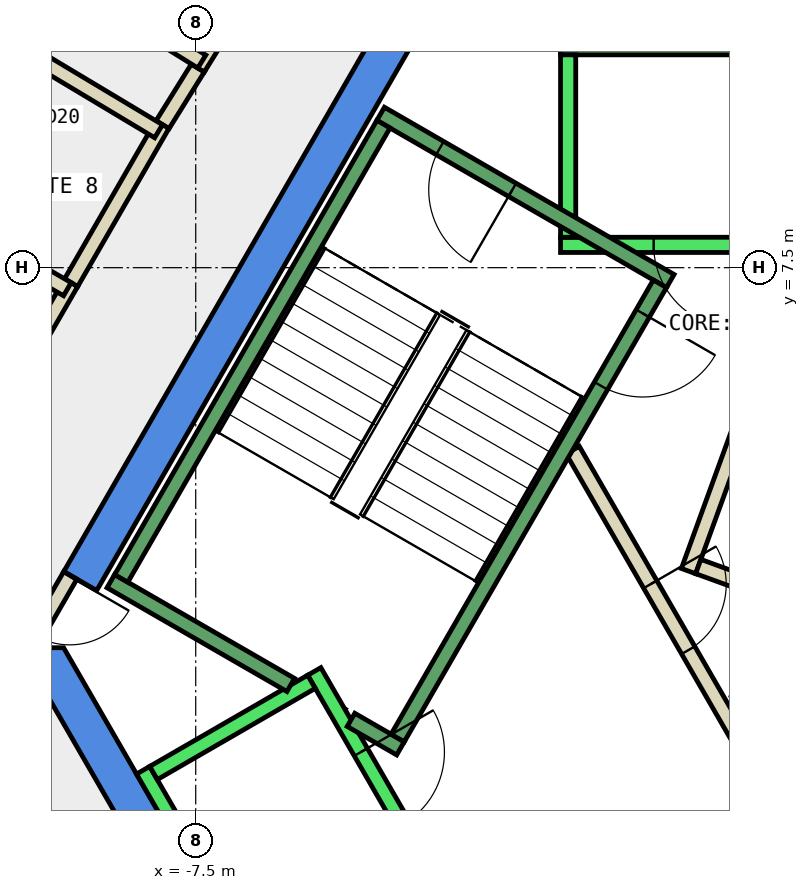
"""IFC4 building model, lengths in metres.
Left out: names, types, materials, properties, quantities, classifications, styles, units other than length and angle.
Written with IfcOpenShell. Run it as: python <this file> out.ifc"""

import sys

from ifc_helpers import new_model, si_unit, direction, frame, frame_2d, origin, place, context, subcontext, project, spatial, polyline, rectangle, outline, extrude, element, fill, save


model = new_model("IFC4")
c1 = context("Model", 3, precision=1e-05, world=origin(), true_north=direction((0.0, 1.0)))
c2 = subcontext(c1, "Body", "Model", "MODEL_VIEW")
j1 = project(units=[si_unit("LENGTHUNIT", "METRE"), si_unit("PLANEANGLEUNIT", "RADIAN")], contexts=[c1])
p1 = place(None, origin())
s1 = spatial("IfcSite", under=j1, at=p1, CompositionType="ELEMENT")
p2 = place(p1, origin())
s2 = spatial("IfcBuilding", under=s1, at=p2, CompositionType="ELEMENT")
p3 = place(p2, frame((0.0, 0.0, 290.0)))
s3 = spatial("IfcBuildingStorey", under=s2, at=p3, CompositionType="ELEMENT", Elevation=290.0)
p4 = place(p3, frame((0.0, 0.0, -0.34)))
e1 = element("IfcWall", 1, at=p4, inside=s3, PredefinedType="SHEAR", context=c2, shape_type="SweptSolid", body=[
    extrude(outline(polyline([(-9.236, 3.502), (-8.803, 3.253), (-4.619, 10.5), (-4.907, 11.0), (-9.236, 3.502)])), origin(), (0.0, 0.0, 1.0), 3.6),
])
p5 = place(p3, frame((0.0, 0.0, -0.34)))
e2 = element("IfcWall", 2, at=p5, inside=s3, PredefinedType="SHEAR", context=c2, shape_type="SweptSolid", body=[
    extrude(outline(polyline([(-9.815, 2.5), (-4.907, -6.0), (-4.619, -5.5), (-9.238, 2.5), (-9.815, 2.5)])), origin(), (0.0, 0.0, 1.0), 3.6),
])
p6 = place(p3, frame((-0.196, 5.764, 0.0), z_axis=(0.0, 0.0, 1.0), x_axis=(-0.34165322761, -0.939826086073, 0.0)))
e3 = element("IfcWall", 3, at=p6, inside=s3, PredefinedType="PARTITIONING", context=c2, shape_type="SweptSolid", body=[
    extrude(rectangle(XDim=2.4, YDim=0.2, at=frame_2d((1.2, 0.0))), origin(), (0.0, 0.0, 1.0), 3.26),
])
p7 = place(p3, frame((-0.888, 3.568, 0.0), z_axis=(0.0, 0.0, 1.0), x_axis=(0.939685034098, -0.34204098686, 0.0)))
e4 = element("IfcWall", 4, at=p7, inside=s3, PredefinedType="PARTITIONING", context=c2, shape_type="SweptSolid", body=[
    extrude(rectangle(XDim=2.237, YDim=0.2, at=frame_2d((1.119, 0.0))), origin(), (0.0, 0.0, 1.0), 3.26),
])
p8 = place(p3, frame((-7.937, 9.38, 0.0), z_axis=(0.0, 0.0, 1.0), x_axis=(0.52850186976, 0.848932137252, 0.0)))
e5 = element("IfcWall", 5, at=p8, inside=s3, PredefinedType="PARTITIONING", context=c2, shape_type="SweptSolid", body=[
    extrude(rectangle(XDim=0.88, YDim=0.2, at=frame_2d((0.44, 0.0))), origin(), (0.0, 0.0, 1.0), 3.26),
])
p9 = place(p3, frame((-7.472, 10.127, 0.0), z_axis=(0.0, 0.0, 1.0), x_axis=(0.527707224705, 0.849426326996, 0.0)))
e6 = element("IfcWall", 6, at=p9, inside=s3, PredefinedType="PARTITIONING", context=c2, shape_type="SweptSolid", body=[
    extrude(rectangle(XDim=3.0, YDim=0.2, at=frame_2d((1.5, 0.0))), origin(), (0.0, 0.0, 1.0), 3.26),
])
p10 = place(p3, frame((-12.082, 2.207, 0.0), z_axis=(0.0, 0.0, 1.0), x_axis=(0.500123454404, 0.865954115618, 0.0)))
e7 = element("IfcWall", 7, at=p10, inside=s3, PredefinedType="PARTITIONING", context=c2, shape_type="SweptSolid", body=[
    extrude(rectangle(XDim=5.885, YDim=0.2, at=frame_2d((2.942, 0.0))), origin(), (0.0, 0.0, 1.0), 3.26),
])
p11 = place(p10, frame((2.493, 0.0, 0.0)))
e8 = element("IfcOpeningElement", 8, at=p11, cuts=e7, PredefinedType="OPENING", context=c2, shape_type="SweptSolid", body=[
    extrude(rectangle(XDim=1.0, YDim=2.1, at=frame_2d((0.5, 1.05))), frame((0.0, 0.11, 0.0), z_axis=(0.0, -1.0, 0.0), x_axis=(1.0, 0.0, 0.0)), (0.0, 0.0, 1.0), 0.22),
])
p12 = place(p3, frame((-9.139, 7.303, 0.0), z_axis=(0.0, 0.0, 1.0), x_axis=(0.499869187296, 0.866100915363, 0.0)))
e9 = element("IfcWall", 9, at=p12, inside=s3, PredefinedType="PARTITIONING", context=c2, shape_type="SweptSolid", body=[
    extrude(rectangle(XDim=2.401, YDim=0.2, at=frame_2d((1.2, 0.0))), origin(), (0.0, 0.0, 1.0), 3.26),
])
p13 = place(p3, frame((-0.982, -1.0, 0.0), z_axis=(0.0, 0.0, 1.0), x_axis=(0.50024047865, 0.865886518847, 0.0)))
e10 = element("IfcWall", 10, at=p13, inside=s3, PredefinedType="PARTITIONING", context=c2, shape_type="SweptSolid", body=[
    extrude(rectangle(XDim=1.863, YDim=0.2, at=frame_2d((0.931, 0.0))), origin(), (0.0, 0.0, 1.0), 3.26),
])
p14 = place(p3, frame((-2.54, 5.1, 0.0), z_axis=(0.0, 0.0, 1.0), x_axis=(0.499925051871, -0.866068670783, 0.0)))
e11 = element("IfcWall", 11, at=p14, inside=s3, PredefinedType="PARTITIONING", context=c2, shape_type="SweptSolid", body=[
    extrude(rectangle(XDim=5.181, YDim=0.2, at=frame_2d((2.59, 0.0))), origin(), (0.0, 0.0, 1.0), 3.26),
])
p15 = place(p14, frame((2.04, 0.0, 0.0)))
e12 = element("IfcOpeningElement", 12, at=p15, cuts=e11, PredefinedType="OPENING", context=c2, shape_type="SweptSolid", body=[
    extrude(rectangle(XDim=1.0, YDim=2.1, at=frame_2d((0.5, 1.05))), frame((0.0, 0.11, 0.0), z_axis=(0.0, -1.0, 0.0), x_axis=(1.0, 0.0, 0.0)), (0.0, 0.0, 1.0), 0.22),
])
p16 = place(p3, frame((-9.543, 11.531, 0.0), z_axis=(0.0, 0.0, 1.0), x_axis=(0.849400119549, -0.527749407305, 0.0)))
e13 = element("IfcWall", 13, at=p16, inside=s3, PredefinedType="PARTITIONING", context=c2, shape_type="SweptSolid", body=[
    extrude(rectangle(XDim=2.5, YDim=0.2, at=frame_2d((1.25, 0.0))), origin(), (0.0, 0.0, 1.0), 3.26),
])
for number, where, z_axis, x_axis in (
    (14, (-7.989, 9.295, 0.0), (0.0, 0.0, 1.0), (-0.858, 0.514, 0.0)),
    (15, (-11.181, 8.367, 0.0), (0.0, 0.0, 1.0), (0.866, -0.5, 0.0)),
):
    element("IfcWall", number, at=place(p3, frame(where, z_axis=z_axis, x_axis=x_axis)), inside=s3, PredefinedType="PARTITIONING", context=c2, shape_type="SweptSolid", body=[
        extrude(rectangle(XDim=2.3, YDim=0.2, at=frame_2d((1.15, 0.0))), origin(), (0.0, 0.0, 1.0), 3.26),
    ])
p17 = place(p3, frame((-9.15, 3.452, 0.0), z_axis=(0.0, 0.0, 1.0), x_axis=(-0.500079945886, -0.865979242085, 0.0)))
e16 = element("IfcWall", 16, at=p17, inside=s3, PredefinedType="PARTITIONING", context=c2, shape_type="SweptSolid", body=[
    extrude(rectangle(XDim=0.926, YDim=0.2, at=frame_2d((0.463, 0.0))), origin(), (0.0, 0.0, 1.0), 2.4),
])
p18 = place(p17, frame((0.017, 0.0, 0.0)))
e17 = element("IfcOpeningElement", 17, at=p18, cuts=e16, PredefinedType="OPENING", context=c2, shape_type="SweptSolid", body=[
    extrude(rectangle(XDim=0.9, YDim=2.1, at=frame_2d((0.45, 1.05))), frame((0.0, 0.11, 0.0), z_axis=(0.0, -1.0, 0.0), x_axis=(1.0, 0.0, 0.0)), (0.0, 0.0, 1.0), 0.22),
])
p19 = place(p3, frame((2.7, 7.8, 0.0), z_axis=(0.0, 0.0, 1.0), x_axis=(-1.0, 0.0, 0.0)))
e18 = element("IfcWall", 18, at=p19, inside=s3, PredefinedType="STANDARD", context=c2, shape_type="SweptSolid", body=[
    extrude(rectangle(XDim=5.4, YDim=0.2, at=frame_2d((2.7, 0.0))), origin(), (0.0, 0.0, 1.0), 3.26),
])
p20 = place(p19, frame((1.225, 0.0, 0.0)))
e19 = element("IfcOpeningElement", 19, at=p20, cuts=e18, PredefinedType="OPENING", context=c2, shape_type="SweptSolid", body=[
    extrude(rectangle(XDim=1.1, YDim=2.1, at=frame_2d((0.55, 1.05))), frame((0.0, 0.11, 0.0), z_axis=(0.0, -1.0, 0.0), x_axis=(1.0, 0.0, 0.0)), (0.0, 0.0, 1.0), 0.22),
])
p21 = place(p19, frame((3.075, 0.0, 0.0)))
e20 = element("IfcOpeningElement", 20, at=p21, cuts=e18, PredefinedType="OPENING", context=c2, shape_type="SweptSolid", body=[
    extrude(rectangle(XDim=1.1, YDim=2.1, at=frame_2d((0.55, 1.05))), frame((0.0, 0.11, 0.0), z_axis=(0.0, -1.0, 0.0), x_axis=(1.0, 0.0, 0.0)), (0.0, 0.0, 1.0), 0.22),
])
p22 = place(p3, frame((2.7, 10.4, 0.0), z_axis=(0.0, 0.0, 1.0), x_axis=(-1.0, 0.0, 0.0)))
e21 = element("IfcWall", 21, at=p22, inside=s3, PredefinedType="STANDARD", context=c2, shape_type="SweptSolid", body=[
    extrude(rectangle(XDim=5.4, YDim=0.2, at=frame_2d((2.7, 0.0))), origin(), (0.0, 0.0, 1.0), 3.26),
])
p23 = place(p3, frame((-2.6, 7.9, 0.0), z_axis=(0.0, 0.0, 1.0), x_axis=(0.0, 1.0, 0.0)))
e22 = element("IfcWall", 22, at=p23, inside=s3, PredefinedType="STANDARD", context=c2, shape_type="SweptSolid", body=[
    extrude(rectangle(XDim=2.4, YDim=0.2, at=frame_2d((1.2, 0.0))), origin(), (0.0, 0.0, 1.0), 3.26),
])
p24 = place(p3, frame((-5.94, 2.188, 0.0), z_axis=(0.0, 0.0, 1.0), x_axis=(0.500034260056, -0.866005622828, 0.0)))
e23 = element("IfcWall", 23, at=p24, inside=s3, PredefinedType="STANDARD", context=c2, shape_type="SweptSolid", body=[
    extrude(rectangle(XDim=5.399, YDim=0.2, at=frame_2d((2.7, 0.0))), origin(), (0.0, 0.0, 1.0), 3.26),
])
p25 = place(p24, frame((3.075, 0.0, 0.0)))
e24 = element("IfcOpeningElement", 24, at=p25, cuts=e23, PredefinedType="OPENING", context=c2, shape_type="SweptSolid", body=[
    extrude(rectangle(XDim=1.1, YDim=2.1, at=frame_2d((0.55, 1.05))), frame((0.0, 0.11, 0.0), z_axis=(0.0, -1.0, 0.0), x_axis=(1.0, 0.0, 0.0)), (0.0, 0.0, 1.0), 0.22),
])
p26 = place(p24, frame((1.225, 0.0, 0.0)))
e25 = element("IfcOpeningElement", 25, at=p26, cuts=e23, PredefinedType="OPENING", context=c2, shape_type="SweptSolid", body=[
    extrude(rectangle(XDim=1.1, YDim=2.1, at=frame_2d((0.55, 1.05))), frame((0.0, 0.11, 0.0), z_axis=(0.0, -1.0, 0.0), x_axis=(1.0, 0.0, 0.0)), (0.0, 0.0, 1.0), 0.22),
])
p27 = place(p3, frame((-8.192, 0.888, 0.0), z_axis=(0.0, 0.0, 1.0), x_axis=(0.500034260056, -0.866005622828, 0.0)))
e26 = element("IfcWall", 26, at=p27, inside=s3, PredefinedType="STANDARD", context=c2, shape_type="SweptSolid", body=[
    extrude(rectangle(XDim=5.399, YDim=0.2, at=frame_2d((2.7, 0.0))), origin(), (0.0, 0.0, 1.0), 3.26),
])
p28 = place(p3, frame((-5.977, 2.052, 0.0), z_axis=(0.0, 0.0, 1.0), x_axis=(-0.865973769406, -0.500089422704, 0.0)))
e27 = element("IfcWall", 27, at=p28, inside=s3, PredefinedType="STANDARD", context=c2, shape_type="SweptSolid", body=[
    extrude(rectangle(XDim=2.399, YDim=0.2, at=frame_2d((1.2, 0.0))), origin(), (0.0, 0.0, 1.0), 3.26),
])
p29 = place(p3, frame((-1.256, 7.324, 0.0), z_axis=(0.0, 0.0, 1.0), x_axis=(-0.866046073146, 0.499964197906, 0.0)))
e28 = element("IfcWall", 28, at=p29, inside=s3, PredefinedType="STANDARD", context=c2, shape_type="SweptSolid", body=[
    extrude(rectangle(XDim=4.4, YDim=0.2, at=frame_2d((2.2, 0.0))), origin(), (0.0, 0.0, 1.0), 3.26),
])
p30 = place(p29, frame((2.4, 0.0, 0.0)))
e29 = element("IfcOpeningElement", 29, at=p30, cuts=e28, PredefinedType="OPENING", context=c2, shape_type="SweptSolid", body=[
    extrude(rectangle(XDim=1.1, YDim=2.2, at=frame_2d((0.55, 1.1))), frame((0.0, 0.11, 0.0), z_axis=(0.0, -1.0, 0.0), x_axis=(1.0, 0.0, 0.0)), (0.0, 0.0, 1.0), 0.22),
])
p31 = place(p3, frame((-6.25, 2.01, 0.0), z_axis=(0.0, 0.0, 1.0), x_axis=(-0.86611865017, 0.499838457731, 0.0)))
e30 = element("IfcWall", 30, at=p31, inside=s3, PredefinedType="STANDARD", context=c2, shape_type="SweptSolid", body=[
    extrude(rectangle(XDim=2.733, YDim=0.2, at=frame_2d((1.366, 0.0))), origin(), (0.0, 0.0, 1.0), 3.26),
])
p32 = place(p3, frame((-4.806, 1.176, 0.0), z_axis=(0.0, 0.0, 1.0), x_axis=(-0.866558586415, 0.499075361355, 0.0)))
e31 = element("IfcWall", 31, at=p32, inside=s3, PredefinedType="STANDARD", context=c2, shape_type="SweptSolid", body=[
    extrude(rectangle(XDim=0.751, YDim=0.2, at=frame_2d((0.376, 0.0))), origin(), (0.0, 0.0, 1.0), 3.26),
])
p33 = place(p3, frame((-1.393, 7.288, 0.0), z_axis=(0.0, 0.0, 1.0), x_axis=(-0.499963383562, -0.866046543262, 0.0)))
e32 = element("IfcWall", 32, at=p33, inside=s3, PredefinedType="STANDARD", context=c2, shape_type="SweptSolid", body=[
    extrude(rectangle(XDim=6.9, YDim=0.2, at=frame_2d((3.45, 0.0))), origin(), (0.0, 0.0, 1.0), 3.26),
])
p34 = place(p33, frame((0.45, 0.0, 0.0)))
e33 = element("IfcOpeningElement", 33, at=p34, cuts=e32, PredefinedType="OPENING", context=c2, shape_type="SweptSolid", body=[
    extrude(rectangle(XDim=1.1, YDim=2.2, at=frame_2d((0.55, 1.1))), frame((0.0, 0.11, 0.0), z_axis=(0.0, -1.0, 0.0), x_axis=(1.0, 0.0, 0.0)), (0.0, 0.0, 1.0), 0.22),
])
p35 = place(p3, frame((-5.03, 9.388, 0.0), z_axis=(0.0, 0.0, 1.0), x_axis=(-0.499978703459, -0.866037698999, 0.0)))
e34 = element("IfcWall", 34, at=p35, inside=s3, PredefinedType="STANDARD", context=c2, shape_type="SweptSolid", body=[
    extrude(rectangle(XDim=6.9, YDim=0.2, at=frame_2d((3.45, 0.0))), origin(), (0.0, 0.0, 1.0), 3.26),
])
p36 = place(p15, origin())
e35 = element("IfcDoor", 35, at=p36, inside=s3, OperationType="SINGLE_SWING_RIGHT", PredefinedType="DOOR", context=c2, shape_type="SweptSolid", body=[
    extrude(rectangle(XDim=1.0, YDim=2.1, at=frame_2d((0.5, 1.05))), frame((0.0, 0.025, 0.0), z_axis=(0.0, -1.0, 0.0), x_axis=(1.0, 0.0, 0.0)), (0.0, 0.0, 1.0), 0.05),
])
fill(e12, e35)
p37 = place(p18, origin())
e36 = element("IfcDoor", 36, at=p37, inside=s3, OperationType="SINGLE_SWING_LEFT", PredefinedType="DOOR", context=c2, shape_type="SweptSolid", body=[
    extrude(rectangle(XDim=0.9, YDim=2.1, at=frame_2d((0.45, 1.05))), frame((0.0, 0.025, 0.0), z_axis=(0.0, -1.0, 0.0), x_axis=(1.0, 0.0, 0.0)), (0.0, 0.0, 1.0), 0.05),
])
fill(e17, e36)
p38 = place(p21, origin())
e37 = element("IfcDoor", 37, at=p38, inside=s3, OperationType="SLIDING_TO_LEFT", PredefinedType="DOOR", context=c2, shape_type="SweptSolid", body=[
    extrude(rectangle(XDim=1.1, YDim=2.1, at=frame_2d((0.55, 1.05))), frame((0.0, 0.025, 0.0), z_axis=(0.0, -1.0, 0.0), x_axis=(1.0, 0.0, 0.0)), (0.0, 0.0, 1.0), 0.05),
])
fill(e20, e37)
p39 = place(p26, origin())
e38 = element("IfcDoor", 38, at=p39, inside=s3, OperationType="SLIDING_TO_LEFT", PredefinedType="DOOR", context=c2, shape_type="SweptSolid", body=[
    extrude(rectangle(XDim=1.1, YDim=2.1, at=frame_2d((0.55, 1.05))), frame((0.0, 0.025, 0.0), z_axis=(0.0, -1.0, 0.0), x_axis=(1.0, 0.0, 0.0)), (0.0, 0.0, 1.0), 0.05),
])
fill(e25, e38)
p40 = place(p34, origin())
e39 = element("IfcDoor", 39, at=p40, inside=s3, OperationType="SINGLE_SWING_LEFT", PredefinedType="DOOR", context=c2, shape_type="SweptSolid", body=[
    extrude(rectangle(XDim=1.1, YDim=2.2, at=frame_2d((0.55, 1.1))), frame((0.0, 0.025, 0.0), z_axis=(0.0, -1.0, 0.0), x_axis=(1.0, 0.0, 0.0)), (0.0, 0.0, 1.0), 0.05),
])
fill(e33, e39)
p41 = place(p30, origin())
e40 = element("IfcDoor", 40, at=p41, inside=s3, OperationType="SINGLE_SWING_LEFT", PredefinedType="DOOR", context=c2, shape_type="SweptSolid", body=[
    extrude(rectangle(XDim=1.1, YDim=2.2, at=frame_2d((0.55, 1.1))), frame((0.0, 0.025, 0.0), z_axis=(0.0, -1.0, 0.0), x_axis=(1.0, 0.0, 0.0)), (0.0, 0.0, 1.0), 0.05),
])
fill(e29, e40)
save(model, sys.argv[1])
